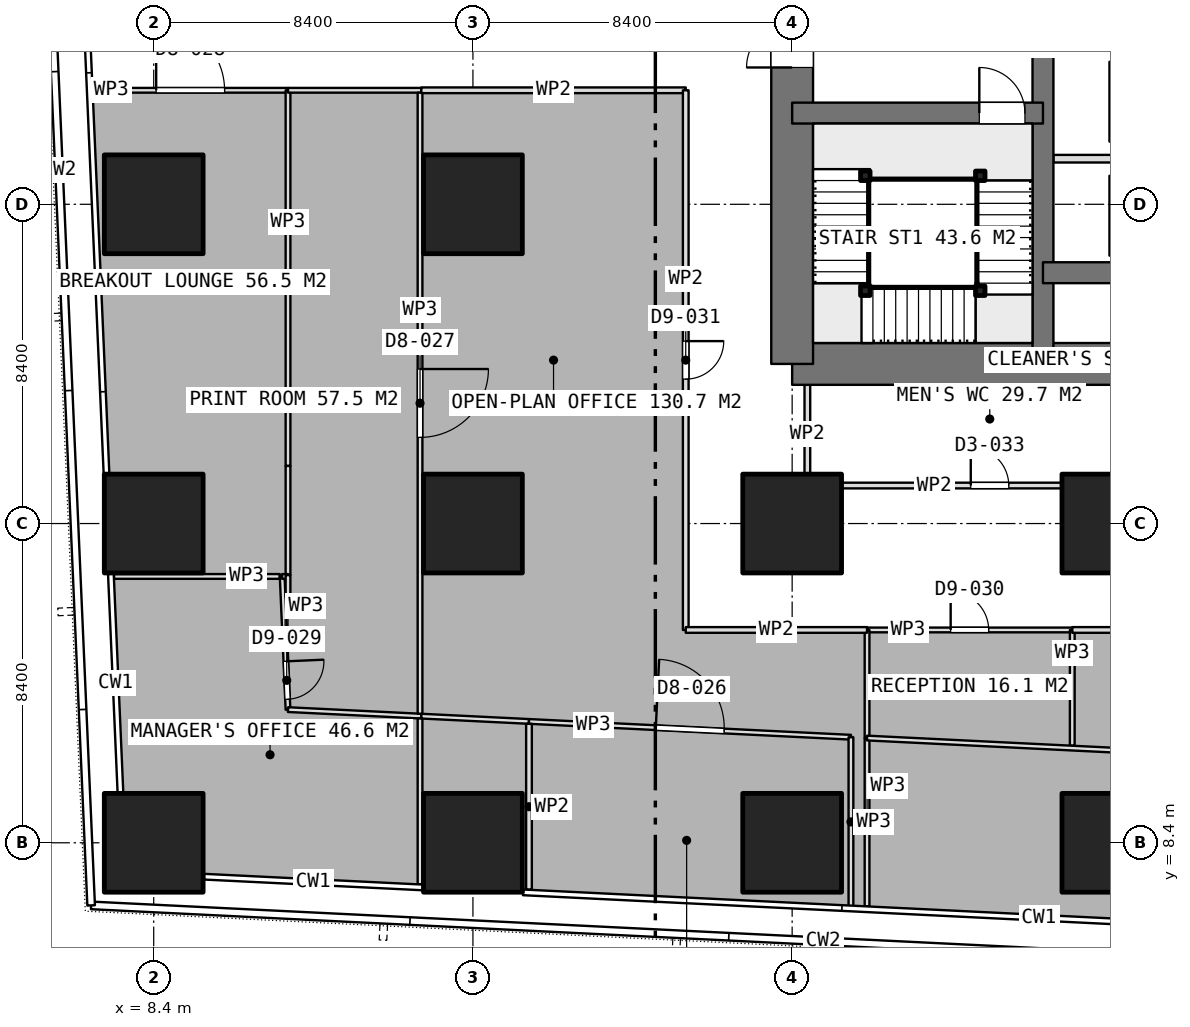
"""IFC4 building model, lengths in metres.
Left out: names, types, materials, properties, quantities, classifications, styles, units other than length and angle.
Written with IfcOpenShell. Run it as: python <this file> out.ifc"""

import sys

from ifc_helpers import new_model, si_unit, direction, frame, frame_2d, origin, origin_2d, place, context, subcontext, project, spatial, rectangle, extrude, element, fill, save


model = new_model("IFC4")
c1 = context("Model", 3, precision=1e-05, world=origin(), true_north=direction((0.0, 1.0)))
c2 = subcontext(c1, "Body", "Model", "MODEL_VIEW")
j1 = project(units=[si_unit("LENGTHUNIT", "METRE"), si_unit("PLANEANGLEUNIT", "RADIAN")], contexts=[c1])
p1 = place(None, origin())
s1 = spatial("IfcSite", under=j1, at=p1, CompositionType="ELEMENT")
p2 = place(p1, origin())
s2 = spatial("IfcBuilding", under=s1, at=p2, CompositionType="ELEMENT")
p3 = place(p2, frame((0.0, 0.0, 29.15)))
s3 = spatial("IfcBuildingStorey", under=s2, at=p3, CompositionType="ELEMENT", Elevation=29.15)
p4 = place(p3, frame((25.2, 21.0, 0.0), z_axis=(0.0, 0.0, 1.0), x_axis=(1.0, 0.0, 0.0)))
e1 = element("IfcWall", 1, at=p4, inside=s3, PredefinedType="SHEAR", context=c2, shape_type="SweptSolid", body=[
    extrude(rectangle(XDim=10.4, YDim=1.1, at=frame_2d((5.2, 0.0))), origin(), (0.0, 0.0, 1.0), 3.75),
])
p5 = place(p3, frame((25.2, 21.0, 0.0), z_axis=(0.0, 0.0, 1.0), x_axis=(0.0, 1.0, 0.0)))
e2 = element("IfcWall", 2, at=p5, inside=s3, PredefinedType="SHEAR", context=c2, shape_type="SweptSolid", body=[
    extrude(rectangle(XDim=25.2, YDim=1.1, at=frame_2d((12.6, 0.0))), origin(), (0.0, 0.0, 1.0), 3.75),
])
p6 = place(p5, frame((7.8, 0.0, 0.0)))
e3 = element("IfcOpeningElement", 3, at=p6, cuts=e2, PredefinedType="OPENING", context=c2, shape_type="SweptSolid", body=[
    extrude(rectangle(XDim=1.2, YDim=2.1, at=frame_2d((0.6, 1.05))), frame((0.0, 0.56, 0.0), z_axis=(0.0, -1.0, 0.0), x_axis=(1.0, 0.0, 0.0)), (0.0, 0.0, 1.0), 1.12),
])
p7 = place(p5, frame((14.25, 0.0, 0.0)))
e4 = element("IfcOpeningElement", 4, at=p7, cuts=e2, PredefinedType="OPENING", context=c2, shape_type="SweptSolid", body=[
    extrude(rectangle(XDim=0.9, YDim=2.1, at=frame_2d((0.45, 1.05))), frame((0.0, 0.56, 0.0), z_axis=(0.0, -1.0, 0.0), x_axis=(1.0, 0.0, 0.0)), (0.0, 0.0, 1.0), 1.12),
])
p8 = place(p5, frame((16.85, 0.0, 0.0)))
e5 = element("IfcOpeningElement", 5, at=p8, cuts=e2, PredefinedType="OPENING", context=c2, shape_type="SweptSolid", body=[
    extrude(rectangle(XDim=0.9, YDim=2.1, at=frame_2d((0.45, 1.05))), frame((0.0, 0.56, 0.0), z_axis=(0.0, -1.0, 0.0), x_axis=(1.0, 0.0, 0.0)), (0.0, 0.0, 1.0), 1.12),
])
p9 = place(p5, frame((19.075, 0.0, 0.0)))
e6 = element("IfcOpeningElement", 6, at=p9, cuts=e2, PredefinedType="OPENING", context=c2, shape_type="SweptSolid", body=[
    extrude(rectangle(XDim=1.2, YDim=2.1, at=frame_2d((0.6, 1.05))), frame((0.0, 0.56, 0.0), z_axis=(0.0, -1.0, 0.0), x_axis=(1.0, 0.0, 0.0)), (0.0, 0.0, 1.0), 1.12),
])
p10 = place(p3, frame((31.8, 21.0, 0.0), z_axis=(0.0, 0.0, 1.0), x_axis=(0.0, 1.0, 0.0)))
e7 = element("IfcWall", 7, at=p10, inside=s3, PredefinedType="SHEAR", context=c2, shape_type="SweptSolid", body=[
    extrude(rectangle(XDim=25.2, YDim=0.55, at=frame_2d((12.6, 0.0))), origin(), (0.0, 0.0, 1.0), 3.75),
])
p11 = place(p3, frame((31.8, 23.4, 0.0), z_axis=(0.0, 0.0, 1.0), x_axis=(1.0, 0.0, 0.0)))
e8 = element("IfcWall", 8, at=p11, inside=s3, PredefinedType="SHEAR", context=c2, shape_type="SweptSolid", body=[
    extrude(rectangle(XDim=3.8, YDim=0.55, at=frame_2d((1.9, 0.0))), origin(), (0.0, 0.0, 1.0), 3.75),
])
p12 = place(p3, frame((25.2, 27.6, 0.0), z_axis=(0.0, 0.0, 1.0), x_axis=(1.0, 0.0, 0.0)))
e9 = element("IfcWall", 9, at=p12, inside=s3, PredefinedType="SHEAR", context=c2, shape_type="SweptSolid", body=[
    extrude(rectangle(XDim=6.6, YDim=0.55, at=frame_2d((3.3, 0.0))), origin(), (0.0, 0.0, 1.0), 3.75),
])
p13 = place(p12, frame((4.925, 0.0, 0.0)))
e10 = element("IfcOpeningElement", 10, at=p13, cuts=e9, PredefinedType="OPENING", context=c2, shape_type="SweptSolid", body=[
    extrude(rectangle(XDim=1.2, YDim=2.1, at=frame_2d((0.6, 1.05))), frame((0.0, 0.285, 0.0), z_axis=(0.0, -1.0, 0.0), x_axis=(1.0, 0.0, 0.0)), (0.0, 0.0, 1.0), 0.57),
])
for number, where, z_axis, x_axis in (
    (11, (8.4, 8.4, 0.0), (0.0, 0.0, 1.0), (1.0, 0.0, 0.0)),
    (12, (8.4, 16.8, 0.0), (0.0, 0.0, 1.0), (1.0, 0.0, 0.0)),
    (13, (8.4, 25.2, 0.0), (0.0, 0.0, 1.0), (1.0, 0.0, 0.0)),
    (14, (16.8, 8.4, 0.0), (0.0, 0.0, 1.0), (1.0, 0.0, 0.0)),
    (15, (16.8, 16.8, 0.0), (0.0, 0.0, 1.0), (1.0, 0.0, 0.0)),
    (16, (16.8, 25.2, 0.0), (0.0, 0.0, 1.0), (1.0, 0.0, 0.0)),
    (17, (25.2, 8.4, 0.0), (0.0, 0.0, 1.0), (1.0, 0.0, 0.0)),
    (18, (25.2, 16.8, 0.0), (0.0, 0.0, 1.0), (1.0, 0.0, 0.0)),
    (19, (33.6, 8.4, 0.0), (0.0, 0.0, 1.0), (1.0, 0.0, 0.0)),
    (20, (33.6, 16.8, 0.0), (0.0, 0.0, 1.0), (1.0, 0.0, 0.0)),
):
    element("IfcColumn", number, at=place(p3, frame(where, z_axis=z_axis, x_axis=x_axis)), inside=s3, PredefinedType="COLUMN", context=c2, shape_type="SweptSolid", body=[
        extrude(rectangle(XDim=2.6, YDim=2.6, at=origin_2d()), origin(), (0.0, 0.0, 1.0), 3.75),
    ])
p14 = place(p3, frame((32.075, 26.4, 0.0), z_axis=(0.0, 0.0, 1.0), x_axis=(1.0, 0.0, 0.0)))
e21 = element("IfcWall", 21, at=p14, inside=s3, PredefinedType="PARTITIONING", context=c2, shape_type="SweptSolid", body=[
    extrude(rectangle(XDim=3.25, YDim=0.2, at=frame_2d((1.625, 0.0))), origin(), (0.0, 0.0, 1.0), 3.5),
])
p15 = place(p3, frame((25.525, 17.8, 0.0), z_axis=(0.0, 0.0, 1.0), x_axis=(1.0, 0.0, 0.0)))
e22 = element("IfcWall", 22, at=p15, inside=s3, PredefinedType="PARTITIONING", context=c2, shape_type="SweptSolid", body=[
    extrude(rectangle(XDim=9.75, YDim=0.15, at=frame_2d((4.875, 0.0))), origin(), (0.0, 0.0, 1.0), 3.5),
])
p16 = place(p15, frame((4.375, 0.0, 0.0)))
e23 = element("IfcOpeningElement", 23, at=p16, cuts=e22, PredefinedType="OPENING", context=c2, shape_type="SweptSolid", body=[
    extrude(rectangle(XDim=1.0, YDim=2.1, at=frame_2d((0.5, 1.05))), frame((0.0, 0.085, 0.0), z_axis=(0.0, -1.0, 0.0), x_axis=(1.0, 0.0, 0.0)), (0.0, 0.0, 1.0), 0.17),
])
p17 = place(p3, frame((25.6, 17.875, 0.0), z_axis=(0.0, 0.0, 1.0), x_axis=(0.0, 1.0, 0.0)))
e24 = element("IfcWall", 24, at=p17, inside=s3, PredefinedType="PARTITIONING", context=c2, shape_type="SweptSolid", body=[
    extrude(rectangle(XDim=2.575, YDim=0.15, at=frame_2d((1.288, 0.0))), origin(), (0.0, 0.0, 1.0), 3.5),
])
p18 = place(p3, frame((27.171, 11.156, 0.0), z_axis=(0.0, 0.0, 1.0), x_axis=(0.998799184112, -0.048991732132, 0.0)))
e25 = element("IfcWall", 25, at=p18, inside=s3, PredefinedType="PARTITIONING", context=c2, shape_type="SweptSolid", body=[
    extrude(rectangle(XDim=7.879, YDim=0.125, at=frame_2d((3.939, 0.0))), origin(), (0.0, 0.0, 1.0), 3.5),
])
p19 = place(p3, frame((27.171, 6.731, 0.0), z_axis=(0.0, 0.0, 1.0), x_axis=(0.0, 1.0, 0.0)))
e26 = element("IfcWall", 26, at=p19, inside=s3, PredefinedType="PARTITIONING", context=c2, shape_type="SweptSolid", body=[
    extrude(rectangle(XDim=4.425, YDim=0.125, at=frame_2d((2.212, 0.0))), origin(), (0.0, 0.0, 1.0), 3.5),
])
p20 = place(p3, frame((27.171, 14.0, 0.0), z_axis=(0.0, 0.0, 1.0), x_axis=(1.0, 0.0, 0.0)))
e27 = element("IfcWall", 27, at=p20, inside=s3, PredefinedType="PARTITIONING", context=c2, shape_type="SweptSolid", body=[
    extrude(rectangle(XDim=5.4, YDim=0.125, at=frame_2d((2.7, 0.0))), origin(), (0.0, 0.0, 1.0), 3.5),
])
p21 = place(p20, frame((2.2, 0.0, 0.0)))
e28 = element("IfcOpeningElement", 28, at=p21, cuts=e27, PredefinedType="OPENING", context=c2, shape_type="SweptSolid", body=[
    extrude(rectangle(XDim=1.0, YDim=2.1, at=frame_2d((0.5, 1.05))), frame((0.0, 0.073, 0.0), z_axis=(0.0, -1.0, 0.0), x_axis=(1.0, 0.0, 0.0)), (0.0, 0.0, 1.0), 0.145),
])
p22 = place(p3, frame((32.571, 14.0, 0.0), z_axis=(0.0, 0.0, 1.0), x_axis=(0.0, -1.0, 0.0)))
e29 = element("IfcWall", 29, at=p22, inside=s3, PredefinedType="PARTITIONING", context=c2, shape_type="SweptSolid", body=[
    extrude(rectangle(XDim=3.046, YDim=0.125, at=frame_2d((1.523, 0.0))), origin(), (0.0, 0.0, 1.0), 3.5),
])
p23 = place(p3, frame((27.171, 11.156, 0.0), z_axis=(0.0, 0.0, 1.0), x_axis=(0.0, 1.0, 0.0)))
e30 = element("IfcWall", 30, at=p23, inside=s3, PredefinedType="PARTITIONING", context=c2, shape_type="SweptSolid", body=[
    extrude(rectangle(XDim=2.844, YDim=0.125, at=frame_2d((1.422, 0.0))), origin(), (0.0, 0.0, 1.0), 3.5),
])
p24 = place(p3, frame((32.571, 14.0, 0.0), z_axis=(0.0, 0.0, 1.0), x_axis=(1.0, 0.0, 0.0)))
e31 = element("IfcWall", 31, at=p24, inside=s3, PredefinedType="PARTITIONING", context=c2, shape_type="SweptSolid", body=[
    extrude(rectangle(XDim=3.729, YDim=0.15, at=frame_2d((1.865, 0.0))), origin(), (0.0, 0.0, 1.0), 3.5),
])
p25 = place(p3, frame((6.767, 28.2, 0.0), z_axis=(0.0, 0.0, 1.0), x_axis=(1.0, 0.0, 0.0)))
e32 = element("IfcWall", 32, at=p25, inside=s3, PredefinedType="PARTITIONING", context=c2, shape_type="SweptSolid", body=[
    extrude(rectangle(XDim=5.167, YDim=0.125, at=frame_2d((2.583, 0.0))), origin(), (0.0, 0.0, 1.0), 3.5),
])
p26 = place(p25, frame((1.698, 0.0, 0.0)))
e33 = element("IfcOpeningElement", 33, at=p26, cuts=e32, PredefinedType="OPENING", context=c2, shape_type="SweptSolid", body=[
    extrude(rectangle(XDim=1.8, YDim=2.1, at=frame_2d((0.9, 1.05))), frame((0.0, 0.073, 0.0), z_axis=(0.0, -1.0, 0.0), x_axis=(1.0, 0.0, 0.0)), (0.0, 0.0, 1.0), 0.145),
])
p27 = place(p3, frame((11.934, 28.2, 0.0), z_axis=(0.0, 0.0, 1.0), x_axis=(0.0, -1.0, 0.0)))
e34 = element("IfcWall", 34, at=p27, inside=s3, PredefinedType="PARTITIONING", context=c2, shape_type="SweptSolid", body=[
    extrude(rectangle(XDim=9.884, YDim=0.125, at=frame_2d((4.942, 0.0))), origin(), (0.0, 0.0, 1.0), 3.5),
])
p28 = place(p3, frame((7.356, 15.408, 0.0), z_axis=(0.0, 0.0, 1.0), x_axis=(1.0, 0.0, 0.0)))
e35 = element("IfcWall", 35, at=p28, inside=s3, PredefinedType="PARTITIONING", context=c2, shape_type="SweptSolid", body=[
    extrude(rectangle(XDim=4.362, YDim=0.125, at=frame_2d((2.181, 0.0))), origin(), (0.0, 0.0, 1.0), 3.5),
])
p29 = place(p3, frame((11.779, 15.443, 0.0), z_axis=(0.0, 0.0, 1.0), x_axis=(0.043763219262, -0.999041931372, 0.0)))
e36 = element("IfcWall", 36, at=p29, inside=s3, PredefinedType="PARTITIONING", context=c2, shape_type="SweptSolid", body=[
    extrude(rectangle(XDim=3.542, YDim=0.125, at=frame_2d((1.771, 0.0))), origin(), (0.0, 0.0, 1.0), 3.5),
])
p30 = place(p29, frame((2.271, 0.0, 0.0)))
e37 = element("IfcOpeningElement", 37, at=p30, cuts=e36, PredefinedType="OPENING", context=c2, shape_type="SweptSolid", body=[
    extrude(rectangle(XDim=1.0, YDim=2.1, at=frame_2d((0.5, 1.05))), frame((0.0, 0.073, 0.0), z_axis=(0.0, -1.0, 0.0), x_axis=(1.0, 0.0, 0.0)), (0.0, 0.0, 1.0), 0.145),
])
p31 = place(p3, frame((11.934, 11.904, 0.0), z_axis=(0.0, 0.0, 1.0), x_axis=(0.998798365868, -0.049008410909, 0.0)))
e38 = element("IfcWall", 38, at=p31, inside=s3, PredefinedType="PARTITIONING", context=c2, shape_type="SweptSolid", body=[
    extrude(rectangle(XDim=3.512, YDim=0.125, at=frame_2d((1.756, 0.0))), origin(), (0.0, 0.0, 1.0), 3.5),
])
p32 = place(p3, frame((15.408, 11.671, 0.0), z_axis=(0.0, 0.0, 1.0), x_axis=(0.0, -1.0, 0.0)))
e39 = element("IfcWall", 39, at=p32, inside=s3, PredefinedType="PARTITIONING", context=c2, shape_type="SweptSolid", body=[
    extrude(rectangle(XDim=4.362, YDim=0.125, at=frame_2d((2.181, 0.0))), origin(), (0.0, 0.0, 1.0), 3.5),
])
p33 = place(p3, frame((15.443, 11.732, 0.0), z_axis=(0.0, 0.0, 1.0), x_axis=(0.998798096744, -0.04901389539, 0.0)))
e40 = element("IfcWall", 40, at=p33, inside=s3, PredefinedType="PARTITIONING", context=c2, shape_type="SweptSolid", body=[
    extrude(rectangle(XDim=2.834, YDim=0.125, at=frame_2d((1.417, 0.0))), origin(), (0.0, 0.0, 1.0), 3.5),
])
p34 = place(p3, frame((18.274, 11.593, 0.0), z_axis=(0.0, 0.0, 1.0), x_axis=(0.998796861193, -0.049039066774, 0.0)))
e41 = element("IfcWall", 41, at=p34, inside=s3, PredefinedType="PARTITIONING", context=c2, shape_type="SweptSolid", body=[
    extrude(rectangle(XDim=8.483, YDim=0.125, at=frame_2d((4.242, 0.0))), origin(), (0.0, 0.0, 1.0), 3.5),
])
p35 = place(p34, frame((3.342, 0.0, 0.0)))
e42 = element("IfcOpeningElement", 42, at=p35, cuts=e41, PredefinedType="OPENING", context=c2, shape_type="SweptSolid", body=[
    extrude(rectangle(XDim=1.8, YDim=2.1, at=frame_2d((0.9, 1.05))), frame((0.0, 0.073, 0.0), z_axis=(0.0, -1.0, 0.0), x_axis=(1.0, 0.0, 0.0)), (0.0, 0.0, 1.0), 0.145),
])
p36 = place(p3, frame((26.747, 11.177, 0.0), z_axis=(0.0, 0.0, 1.0), x_axis=(0.0, -1.0, 0.0)))
e43 = element("IfcWall", 43, at=p36, inside=s3, PredefinedType="PARTITIONING", context=c2, shape_type="SweptSolid", body=[
    extrude(rectangle(XDim=4.455, YDim=0.125, at=frame_2d((2.228, 0.0))), origin(), (0.0, 0.0, 1.0), 3.5),
])
p37 = place(p3, frame((11.934, 18.316, 0.0), z_axis=(0.0, 0.0, 1.0), x_axis=(0.0, -1.0, 0.0)))
e44 = element("IfcWall", 44, at=p37, inside=s3, PredefinedType="PARTITIONING", context=c2, shape_type="SweptSolid", body=[
    extrude(rectangle(XDim=2.873, YDim=0.125, at=frame_2d((1.437, 0.0))), origin(), (0.0, 0.0, 1.0), 3.5),
])
p38 = place(p3, frame((11.934, 15.408, 0.0), z_axis=(0.0, 0.0, 1.0), x_axis=(-1.0, 0.0, 0.0)))
e45 = element("IfcWall", 45, at=p38, inside=s3, PredefinedType="PARTITIONING", context=c2, shape_type="SweptSolid", body=[
    extrude(rectangle(XDim=0.155, YDim=0.125, at=frame_2d((0.078, 0.0))), origin(), (0.0, 0.0, 1.0), 3.5),
])
p39 = place(p3, frame((11.934, 28.2, 0.0), z_axis=(0.0, 0.0, 1.0), x_axis=(1.0, 0.0, 0.0)))
e46 = element("IfcWall", 46, at=p39, inside=s3, PredefinedType="PARTITIONING", context=c2, shape_type="SweptSolid", body=[
    extrude(rectangle(XDim=3.508, YDim=0.125, at=frame_2d((1.754, 0.0))), origin(), (0.0, 0.0, 1.0), 3.5),
])
p40 = place(p3, frame((15.408, 28.137, 0.0), z_axis=(0.0, 0.0, 1.0), x_axis=(0.0, -1.0, 0.0)))
e47 = element("IfcWall", 47, at=p40, inside=s3, PredefinedType="PARTITIONING", context=c2, shape_type="SweptSolid", body=[
    extrude(rectangle(XDim=16.341, YDim=0.125, at=frame_2d((8.17, 0.0))), origin(), (0.0, 0.0, 1.0), 3.5),
])
p41 = place(p40, frame((7.271, 0.0, 0.0)))
e48 = element("IfcOpeningElement", 48, at=p41, cuts=e47, PredefinedType="OPENING", context=c2, shape_type="SweptSolid", body=[
    extrude(rectangle(XDim=1.8, YDim=2.1, at=frame_2d((0.9, 1.05))), frame((0.0, 0.073, 0.0), z_axis=(0.0, -1.0, 0.0), x_axis=(1.0, 0.0, 0.0)), (0.0, 0.0, 1.0), 0.145),
])
p42 = place(p3, frame((11.934, 14.875, 0.0), z_axis=(0.0, 0.0, 1.0), x_axis=(0.0, 1.0, 0.0)))
e49 = element("IfcWall", 49, at=p42, inside=s3, PredefinedType="PARTITIONING", context=c2, shape_type="SweptSolid", body=[
    extrude(rectangle(XDim=0.568, YDim=0.125, at=frame_2d((0.284, 0.0))), origin(), (0.0, 0.0, 1.0), 3.5),
])
p43 = place(p3, frame((18.275, 11.53, 0.0), z_axis=(0.0, 0.0, 1.0), x_axis=(0.0, -1.0, 0.0)))
e50 = element("IfcWall", 50, at=p43, inside=s3, PredefinedType="PARTITIONING", context=c2, shape_type="SweptSolid", body=[
    extrude(rectangle(XDim=4.362, YDim=0.15, at=frame_2d((2.181, 0.0))), origin(), (0.0, 0.0, 1.0), 3.5),
])
p44 = place(p3, frame((15.442, 28.2, 0.0), z_axis=(0.0, 0.0, 1.0), x_axis=(1.0, 0.0, 0.0)))
e51 = element("IfcWall", 51, at=p44, inside=s3, PredefinedType="PARTITIONING", context=c2, shape_type="SweptSolid", body=[
    extrude(rectangle(XDim=6.958, YDim=0.15, at=frame_2d((3.479, 0.0))), origin(), (0.0, 0.0, 1.0), 3.5),
])
p45 = place(p3, frame((22.4, 28.2, 0.0), z_axis=(0.0, 0.0, 1.0), x_axis=(0.0, -1.0, 0.0)))
e52 = element("IfcWall", 52, at=p45, inside=s3, PredefinedType="PARTITIONING", context=c2, shape_type="SweptSolid", body=[
    extrude(rectangle(XDim=14.2, YDim=0.15, at=frame_2d((7.1, 0.0))), origin(), (0.0, 0.0, 1.0), 3.5),
])
p46 = place(p45, frame((6.6, 0.0, 0.0)))
e53 = element("IfcOpeningElement", 53, at=p46, cuts=e52, PredefinedType="OPENING", context=c2, shape_type="SweptSolid", body=[
    extrude(rectangle(XDim=1.0, YDim=2.1, at=frame_2d((0.5, 1.05))), frame((0.0, 0.085, 0.0), z_axis=(0.0, -1.0, 0.0), x_axis=(1.0, 0.0, 0.0)), (0.0, 0.0, 1.0), 0.17),
])
p47 = place(p3, frame((22.4, 14.0, 0.0), z_axis=(0.0, 0.0, 1.0), x_axis=(1.0, 0.0, 0.0)))
e54 = element("IfcWall", 54, at=p47, inside=s3, PredefinedType="PARTITIONING", context=c2, shape_type="SweptSolid", body=[
    extrude(rectangle(XDim=4.77, YDim=0.15, at=frame_2d((2.385, 0.0))), origin(), (0.0, 0.0, 1.0), 3.5),
])
for number, where, z_axis, x_axis in (
    (55, (30.15, 25.95, 0.0), (0.0, 0.0, 1.0), (1.0, 0.0, 0.0)),
    (56, (30.15, 22.925, 0.0), (0.0, 0.0, 1.0), (1.0, 0.0, 0.0)),
    (57, (27.125, 22.925, 0.0), (0.0, 0.0, 1.0), (1.0, 0.0, 0.0)),
    (58, (27.125, 25.95, 0.0), (0.0, 0.0, 1.0), (1.0, 0.0, 0.0)),
):
    element("IfcColumn", number, at=place(p3, frame(where, z_axis=z_axis, x_axis=x_axis)), inside=s3, PredefinedType="COLUMN", context=c2, shape_type="SweptSolid", body=[
        extrude(rectangle(XDim=0.25, YDim=0.25, at=origin_2d()), origin(), (0.0, 0.0, 1.0), 3.75),
    ])
p48 = place(p6, origin())
e59 = element("IfcDoor", 59, at=p48, inside=s3, OperationType="SINGLE_SWING_LEFT", PredefinedType="DOOR", context=c2, shape_type="SweptSolid", body=[
    extrude(rectangle(XDim=1.2, YDim=2.1, at=frame_2d((0.6, 1.05))), frame((0.0, 0.025, 0.0), z_axis=(0.0, -1.0, 0.0), x_axis=(1.0, 0.0, 0.0)), (0.0, 0.0, 1.0), 0.05),
])
fill(e3, e59)
p49 = place(p16, origin())
e60 = element("IfcDoor", 60, at=p49, inside=s3, OperationType="SINGLE_SWING_LEFT", PredefinedType="DOOR", context=c2, shape_type="SweptSolid", body=[
    extrude(rectangle(XDim=1.0, YDim=2.1, at=frame_2d((0.5, 1.05))), frame((0.0, 0.025, 0.0), z_axis=(0.0, -1.0, 0.0), x_axis=(1.0, 0.0, 0.0)), (0.0, 0.0, 1.0), 0.05),
])
fill(e23, e60)
p50 = place(p21, origin())
e61 = element("IfcDoor", 61, at=p50, inside=s3, OperationType="SINGLE_SWING_LEFT", PredefinedType="DOOR", context=c2, shape_type="SweptSolid", body=[
    extrude(rectangle(XDim=1.0, YDim=2.1, at=frame_2d((0.5, 1.05))), frame((0.0, 0.025, 0.0), z_axis=(0.0, -1.0, 0.0), x_axis=(1.0, 0.0, 0.0)), (0.0, 0.0, 1.0), 0.05),
])
fill(e28, e61)
p51 = place(p26, origin())
e62 = element("IfcDoor", 62, at=p51, inside=s3, OperationType="DOUBLE_DOOR_SINGLE_SWING", PredefinedType="DOOR", context=c2, shape_type="SweptSolid", body=[
    extrude(rectangle(XDim=1.8, YDim=2.1, at=frame_2d((0.9, 1.05))), frame((0.0, 0.025, 0.0), z_axis=(0.0, -1.0, 0.0), x_axis=(1.0, 0.0, 0.0)), (0.0, 0.0, 1.0), 0.05),
])
fill(e33, e62)
p52 = place(p35, origin())
e63 = element("IfcDoor", 63, at=p52, inside=s3, OperationType="DOUBLE_DOOR_SINGLE_SWING", PredefinedType="DOOR", context=c2, shape_type="SweptSolid", body=[
    extrude(rectangle(XDim=1.8, YDim=2.1, at=frame_2d((0.9, 1.05))), frame((0.0, 0.025, 0.0), z_axis=(0.0, -1.0, 0.0), x_axis=(1.0, 0.0, 0.0)), (0.0, 0.0, 1.0), 0.05),
])
fill(e42, e63)
p53 = place(p41, origin())
e64 = element("IfcDoor", 64, at=p53, inside=s3, OperationType="DOUBLE_DOOR_SINGLE_SWING", PredefinedType="DOOR", context=c2, shape_type="SweptSolid", body=[
    extrude(rectangle(XDim=1.8, YDim=2.1, at=frame_2d((0.9, 1.05))), frame((0.0, 0.025, 0.0), z_axis=(0.0, -1.0, 0.0), x_axis=(1.0, 0.0, 0.0)), (0.0, 0.0, 1.0), 0.05),
])
fill(e48, e64)
p54 = place(p46, origin())
e65 = element("IfcDoor", 65, at=p54, inside=s3, OperationType="SINGLE_SWING_LEFT", PredefinedType="DOOR", context=c2, shape_type="SweptSolid", body=[
    extrude(rectangle(XDim=1.0, YDim=2.1, at=frame_2d((0.5, 1.05))), frame((0.0, 0.025, 0.0), z_axis=(0.0, -1.0, 0.0), x_axis=(1.0, 0.0, 0.0)), (0.0, 0.0, 1.0), 0.05),
])
fill(e53, e65)
p55 = place(p30, origin())
e66 = element("IfcDoor", 66, at=p55, inside=s3, OperationType="SINGLE_SWING_LEFT", PredefinedType="DOOR", context=c2, shape_type="SweptSolid", body=[
    extrude(rectangle(XDim=1.0, YDim=2.1, at=frame_2d((0.5, 1.05))), frame((0.0, 0.025, 0.0), z_axis=(0.0, -1.0, 0.0), x_axis=(1.0, 0.0, 0.0)), (0.0, 0.0, 1.0), 0.05),
])
fill(e37, e66)
p56 = place(p13, origin())
e67 = element("IfcDoor", 67, at=p56, inside=s3, OperationType="SINGLE_SWING_RIGHT", PredefinedType="DOOR", context=c2, shape_type="SweptSolid", body=[
    extrude(rectangle(XDim=1.2, YDim=2.1, at=frame_2d((0.6, 1.05))), frame((0.0, 0.025, 0.0), z_axis=(0.0, -1.0, 0.0), x_axis=(1.0, 0.0, 0.0)), (0.0, 0.0, 1.0), 0.05),
])
fill(e10, e67)
save(model, sys.argv[1])
